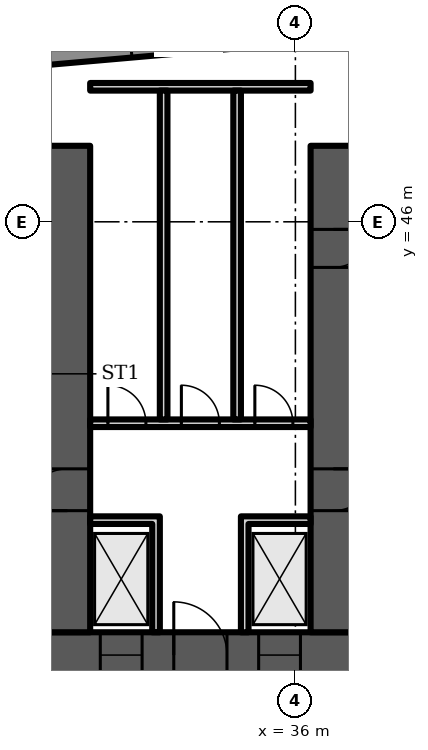
"""IFC4 building model, lengths in metres.
Left out: names, types, materials, properties, quantities, classifications, styles, units other than length and angle.
Written with IfcOpenShell. Run it as: python <this file> out.ifc"""

import sys

from ifc_helpers import new_model, si_unit, direction, frame, frame_2d, origin, place, context, subcontext, project, spatial, polyline, rectangle, outline, extrude, element, fill, save


model = new_model("IFC4")
c1 = context("Model", 3, precision=1e-05, world=origin(), true_north=direction((0.0, 1.0)))
c2 = subcontext(c1, "Body", "Model", "MODEL_VIEW")
j1 = project(units=[si_unit("LENGTHUNIT", "METRE"), si_unit("PLANEANGLEUNIT", "RADIAN")], contexts=[c1])
p1 = place(None, origin())
s1 = spatial("IfcSite", under=j1, at=p1, CompositionType="ELEMENT")
p2 = place(p1, origin())
s2 = spatial("IfcBuilding", under=s1, at=p2, CompositionType="ELEMENT")
p3 = place(p2, frame((0.0, 0.0, 21.5)))
s3 = spatial("IfcBuildingStorey", under=s2, at=p3, CompositionType="ELEMENT", Elevation=21.5)
p4 = place(p3, frame((47.301, 50.11, 0.0), z_axis=(0.0, 0.0, 1.0), x_axis=(-0.996195, 0.087143, 0.0)))
e1 = element("IfcWall", 1, at=p4, inside=s3, PredefinedType="SOLIDWALL", context=c2, shape_type="SweptSolid", body=[
    extrude(rectangle(XDim=10.26, YDim=0.45, at=frame_2d((5.13, 0.0))), origin(), (0.0, 0.0, 1.0), 5.7),
])
p5 = place(p4, frame((1.065, 0.0, 1.0)))
e2 = element("IfcOpeningElement", 2, at=p5, cuts=e1, PredefinedType="OPENING", context=c2, shape_type="SweptSolid", body=[
    extrude(rectangle(XDim=3.0, YDim=3.7, at=frame_2d((1.5, 1.85))), frame((0.0, 0.235, 0.0), z_axis=(0.0, -1.0, 0.0), x_axis=(1.0, 0.0, 0.0)), (0.0, 0.0, 1.0), 0.47),
])
p6 = place(p4, frame((6.195, 0.0, 1.0)))
e3 = element("IfcOpeningElement", 3, at=p6, cuts=e1, PredefinedType="OPENING", context=c2, shape_type="SweptSolid", body=[
    extrude(rectangle(XDim=3.0, YDim=3.7, at=frame_2d((1.5, 1.85))), frame((0.0, 0.235, 0.0), z_axis=(0.0, -1.0, 0.0), x_axis=(1.0, 0.0, 0.0)), (0.0, 0.0, 1.0), 0.47),
])
p7 = place(p3, frame((36.0, 50.924, 0.0), z_axis=(0.0, 0.0, 1.0), x_axis=(-0.996195, -0.087145, 0.0)))
e4 = element("IfcWall", 4, at=p7, inside=s3, PredefinedType="SOLIDWALL", context=c2, shape_type="SweptSolid", body=[
    extrude(rectangle(XDim=11.344, YDim=0.45, at=frame_2d((5.672, 0.0))), origin(), (0.0, 0.0, 1.0), 5.7),
])
p8 = place(p7, frame((1.336, 0.0, 1.0)))
e5 = element("IfcOpeningElement", 5, at=p8, cuts=e4, PredefinedType="OPENING", context=c2, shape_type="SweptSolid", body=[
    extrude(rectangle(XDim=3.0, YDim=3.7, at=frame_2d((1.5, 1.85))), frame((0.0, 0.235, 0.0), z_axis=(0.0, -1.0, 0.0), x_axis=(1.0, 0.0, 0.0)), (0.0, 0.0, 1.0), 0.47),
])
p9 = place(p7, frame((7.008, 0.0, 1.0)))
e6 = element("IfcOpeningElement", 6, at=p9, cuts=e4, PredefinedType="OPENING", context=c2, shape_type="SweptSolid", body=[
    extrude(rectangle(XDim=3.0, YDim=3.7, at=frame_2d((1.5, 1.85))), frame((0.0, 0.235, 0.0), z_axis=(0.0, -1.0, 0.0), x_axis=(1.0, 0.0, 0.0)), (0.0, 0.0, 1.0), 0.47),
])
p10 = place(p3, frame((9.0, 34.6, 0.0), z_axis=(0.0, 0.0, 1.0), x_axis=(1.0, 0.0, 0.0)))
e7 = element("IfcWall", 7, at=p10, inside=s3, PredefinedType="SHEAR", context=c2, shape_type="SweptSolid", body=[
    extrude(rectangle(XDim=56.0, YDim=1.2, at=frame_2d((28.0, 0.0))), origin(), (0.0, 0.0, 1.0), 5.7),
])
p11 = place(p10, frame((2.0, 0.0, 0.0)))
e8 = element("IfcOpeningElement", 8, at=p11, cuts=e7, PredefinedType="OPENING", context=c2, shape_type="SweptSolid", body=[
    extrude(rectangle(XDim=1.0, YDim=2.1, at=frame_2d((0.5, 1.05))), frame((0.0, 0.61, 0.0), z_axis=(0.0, -1.0, 0.0), x_axis=(1.0, 0.0, 0.0)), (0.0, 0.0, 1.0), 1.22),
])
p12 = place(p10, frame((4.6, 0.0, 0.0)))
e9 = element("IfcOpeningElement", 9, at=p12, cuts=e7, PredefinedType="OPENING", context=c2, shape_type="SweptSolid", body=[
    extrude(rectangle(XDim=1.0, YDim=2.1, at=frame_2d((0.5, 1.05))), frame((0.0, 0.61, 0.0), z_axis=(0.0, -1.0, 0.0), x_axis=(1.0, 0.0, 0.0)), (0.0, 0.0, 1.0), 1.22),
])
p13 = place(p10, frame((7.867, 0.0, 0.0)))
e10 = element("IfcOpeningElement", 10, at=p13, cuts=e7, PredefinedType="OPENING", context=c2, shape_type="SweptSolid", body=[
    extrude(rectangle(XDim=1.1, YDim=2.1, at=frame_2d((0.55, 1.05))), frame((0.0, 0.61, 0.0), z_axis=(0.0, -1.0, 0.0), x_axis=(1.0, 0.0, 0.0)), (0.0, 0.0, 1.0), 1.22),
])
p14 = place(p10, frame((12.033, 0.0, 0.0)))
e11 = element("IfcOpeningElement", 11, at=p14, cuts=e7, PredefinedType="OPENING", context=c2, shape_type="SweptSolid", body=[
    extrude(rectangle(XDim=1.1, YDim=2.1, at=frame_2d((0.55, 1.05))), frame((0.0, 0.61, 0.0), z_axis=(0.0, -1.0, 0.0), x_axis=(1.0, 0.0, 0.0)), (0.0, 0.0, 1.0), 1.22),
])
p15 = place(p10, frame((9.8, 0.0, 0.0)))
e12 = element("IfcOpeningElement", 12, at=p15, cuts=e7, PredefinedType="OPENING", context=c2, shape_type="SweptSolid", body=[
    extrude(rectangle(XDim=1.4, YDim=2.1, at=frame_2d((0.7, 1.05))), frame((0.0, 0.61, 0.0), z_axis=(0.0, -1.0, 0.0), x_axis=(1.0, 0.0, 0.0)), (0.0, 0.0, 1.0), 1.22),
])
p16 = place(p10, frame((14.65, 0.0, 0.0)))
e13 = element("IfcOpeningElement", 13, at=p16, cuts=e7, PredefinedType="OPENING", context=c2, shape_type="SweptSolid", body=[
    extrude(rectangle(XDim=1.2, YDim=2.1, at=frame_2d((0.6, 1.05))), frame((0.0, 0.61, 0.0), z_axis=(0.0, -1.0, 0.0), x_axis=(1.0, 0.0, 0.0)), (0.0, 0.0, 1.0), 1.22),
])
p17 = place(p10, frame((21.867, 0.0, 0.0)))
e14 = element("IfcOpeningElement", 14, at=p17, cuts=e7, PredefinedType="OPENING", context=c2, shape_type="SweptSolid", body=[
    extrude(rectangle(XDim=1.1, YDim=2.1, at=frame_2d((0.55, 1.05))), frame((0.0, 0.61, 0.0), z_axis=(0.0, -1.0, 0.0), x_axis=(1.0, 0.0, 0.0)), (0.0, 0.0, 1.0), 1.22),
])
p18 = place(p10, frame((26.033, 0.0, 0.0)))
e15 = element("IfcOpeningElement", 15, at=p18, cuts=e7, PredefinedType="OPENING", context=c2, shape_type="SweptSolid", body=[
    extrude(rectangle(XDim=1.1, YDim=2.1, at=frame_2d((0.55, 1.05))), frame((0.0, 0.61, 0.0), z_axis=(0.0, -1.0, 0.0), x_axis=(1.0, 0.0, 0.0)), (0.0, 0.0, 1.0), 1.22),
])
p19 = place(p10, frame((23.8, 0.0, 0.0)))
e16 = element("IfcOpeningElement", 16, at=p19, cuts=e7, PredefinedType="OPENING", context=c2, shape_type="SweptSolid", body=[
    extrude(rectangle(XDim=1.4, YDim=2.1, at=frame_2d((0.7, 1.05))), frame((0.0, 0.61, 0.0), z_axis=(0.0, -1.0, 0.0), x_axis=(1.0, 0.0, 0.0)), (0.0, 0.0, 1.0), 1.22),
])
p20 = place(p10, frame((28.867, 0.0, 0.0)))
e17 = element("IfcOpeningElement", 17, at=p20, cuts=e7, PredefinedType="OPENING", context=c2, shape_type="SweptSolid", body=[
    extrude(rectangle(XDim=1.1, YDim=2.1, at=frame_2d((0.55, 1.05))), frame((0.0, 0.61, 0.0), z_axis=(0.0, -1.0, 0.0), x_axis=(1.0, 0.0, 0.0)), (0.0, 0.0, 1.0), 1.22),
])
p21 = place(p10, frame((33.033, 0.0, 0.0)))
e18 = element("IfcOpeningElement", 18, at=p21, cuts=e7, PredefinedType="OPENING", context=c2, shape_type="SweptSolid", body=[
    extrude(rectangle(XDim=1.1, YDim=2.1, at=frame_2d((0.55, 1.05))), frame((0.0, 0.61, 0.0), z_axis=(0.0, -1.0, 0.0), x_axis=(1.0, 0.0, 0.0)), (0.0, 0.0, 1.0), 1.22),
])
p22 = place(p10, frame((40.15, 0.0, 0.0)))
e19 = element("IfcOpeningElement", 19, at=p22, cuts=e7, PredefinedType="OPENING", context=c2, shape_type="SweptSolid", body=[
    extrude(rectangle(XDim=1.2, YDim=2.1, at=frame_2d((0.6, 1.05))), frame((0.0, 0.61, 0.0), z_axis=(0.0, -1.0, 0.0), x_axis=(1.0, 0.0, 0.0)), (0.0, 0.0, 1.0), 1.22),
])
p23 = place(p10, frame((44.8, 0.0, 0.0)))
e20 = element("IfcOpeningElement", 20, at=p23, cuts=e7, PredefinedType="OPENING", context=c2, shape_type="SweptSolid", body=[
    extrude(rectangle(XDim=1.4, YDim=2.1, at=frame_2d((0.7, 1.05))), frame((0.0, 0.61, 0.0), z_axis=(0.0, -1.0, 0.0), x_axis=(1.0, 0.0, 0.0)), (0.0, 0.0, 1.0), 1.22),
])
p24 = place(p10, frame((49.867, 0.0, 0.0)))
e21 = element("IfcOpeningElement", 21, at=p24, cuts=e7, PredefinedType="OPENING", context=c2, shape_type="SweptSolid", body=[
    extrude(rectangle(XDim=1.1, YDim=2.1, at=frame_2d((0.55, 1.05))), frame((0.0, 0.61, 0.0), z_axis=(0.0, -1.0, 0.0), x_axis=(1.0, 0.0, 0.0)), (0.0, 0.0, 1.0), 1.22),
])
p25 = place(p10, frame((53.5, 0.0, 0.0)))
e22 = element("IfcOpeningElement", 22, at=p25, cuts=e7, PredefinedType="OPENING", context=c2, shape_type="SweptSolid", body=[
    extrude(rectangle(XDim=1.1, YDim=2.1, at=frame_2d((0.55, 1.05))), frame((0.0, 0.61, 0.0), z_axis=(0.0, -1.0, 0.0), x_axis=(1.0, 0.0, 0.0)), (0.0, 0.0, 1.0), 1.22),
])
p26 = place(p10, frame((51.567, 0.0, 0.0)))
e23 = element("IfcOpeningElement", 23, at=p26, cuts=e7, PredefinedType="OPENING", context=c2, shape_type="SweptSolid", body=[
    extrude(rectangle(XDim=1.4, YDim=2.1, at=frame_2d((0.7, 1.05))), frame((0.0, 0.61, 0.0), z_axis=(0.0, -1.0, 0.0), x_axis=(1.0, 0.0, 0.0)), (0.0, 0.0, 1.0), 1.22),
])
p27 = place(p3, frame((30.0, 35.2, 0.0), z_axis=(0.0, 0.0, 1.0), x_axis=(0.0, 1.0, 0.0)))
e24 = element("IfcWall", 24, at=p27, inside=s3, PredefinedType="SHEAR", context=c2, shape_type="SweptSolid", body=[
    extrude(rectangle(XDim=12.8, YDim=1.2, at=frame_2d((6.4, 0.0))), origin(), (0.0, 0.0, 1.0), 5.7),
])
p28 = place(p27, frame((3.2, 0.0, 0.0)))
e25 = element("IfcOpeningElement", 25, at=p28, cuts=e24, PredefinedType="OPENING", context=c2, shape_type="SweptSolid", body=[
    extrude(rectangle(XDim=1.1, YDim=2.1, at=frame_2d((0.55, 1.05))), frame((0.0, 0.61, 0.0), z_axis=(0.0, -1.0, 0.0), x_axis=(1.0, 0.0, 0.0)), (0.0, 0.0, 1.0), 1.22),
])
p29 = place(p3, frame((37.0, 35.2, 0.0), z_axis=(0.0, 0.0, 1.0), x_axis=(0.0, 1.0, 0.0)))
e26 = element("IfcWall", 26, at=p29, inside=s3, PredefinedType="SHEAR", context=c2, shape_type="SweptSolid", body=[
    extrude(rectangle(XDim=12.8, YDim=1.2, at=frame_2d((6.4, 0.0))), origin(), (0.0, 0.0, 1.0), 5.7),
])
p30 = place(p29, frame((3.2, 0.0, 0.0)))
e27 = element("IfcOpeningElement", 27, at=p30, cuts=e26, PredefinedType="OPENING", context=c2, shape_type="SweptSolid", body=[
    extrude(rectangle(XDim=1.1, YDim=2.1, at=frame_2d((0.55, 1.05))), frame((0.0, 0.61, 0.0), z_axis=(0.0, -1.0, 0.0), x_axis=(1.0, 0.0, 0.0)), (0.0, 0.0, 1.0), 1.22),
])
p31 = place(p29, frame((9.6, 0.0, 0.0)))
e28 = element("IfcOpeningElement", 28, at=p31, cuts=e26, PredefinedType="OPENING", context=c2, shape_type="SweptSolid", body=[
    extrude(rectangle(XDim=1.0, YDim=2.1, at=frame_2d((0.5, 1.05))), frame((0.0, 0.61, 0.0), z_axis=(0.0, -1.0, 0.0), x_axis=(1.0, 0.0, 0.0)), (0.0, 0.0, 1.0), 1.22),
])
p32 = place(p3, frame((30.6, 40.7, 0.0), z_axis=(0.0, 0.0, 1.0), x_axis=(1.0, 0.0, 0.0)))
e29 = element("IfcWall", 29, at=p32, inside=s3, PredefinedType="PARTITIONING", context=c2, shape_type="SweptSolid", body=[
    extrude(rectangle(XDim=5.8, YDim=0.2, at=frame_2d((2.9, 0.0))), origin(), (0.0, 0.0, 1.0), 5.7),
])
p33 = place(p32, frame((0.467, 0.0, 0.0)))
e30 = element("IfcOpeningElement", 30, at=p33, cuts=e29, PredefinedType="OPENING", context=c2, shape_type="SweptSolid", body=[
    extrude(rectangle(XDim=1.0, YDim=2.1, at=frame_2d((0.5, 1.05))), frame((0.0, 0.11, 0.0), z_axis=(0.0, -1.0, 0.0), x_axis=(1.0, 0.0, 0.0)), (0.0, 0.0, 1.0), 0.22),
])
p34 = place(p32, frame((2.4, 0.0, 0.0)))
e31 = element("IfcOpeningElement", 31, at=p34, cuts=e29, PredefinedType="OPENING", context=c2, shape_type="SweptSolid", body=[
    extrude(rectangle(XDim=1.0, YDim=2.1, at=frame_2d((0.5, 1.05))), frame((0.0, 0.11, 0.0), z_axis=(0.0, -1.0, 0.0), x_axis=(1.0, 0.0, 0.0)), (0.0, 0.0, 1.0), 0.22),
])
p35 = place(p32, frame((4.333, 0.0, 0.0)))
e32 = element("IfcOpeningElement", 32, at=p35, cuts=e29, PredefinedType="OPENING", context=c2, shape_type="SweptSolid", body=[
    extrude(rectangle(XDim=1.0, YDim=2.1, at=frame_2d((0.5, 1.05))), frame((0.0, 0.11, 0.0), z_axis=(0.0, -1.0, 0.0), x_axis=(1.0, 0.0, 0.0)), (0.0, 0.0, 1.0), 0.22),
])
p36 = place(p3, frame((0.0, 0.0, -0.0)))
e33 = element("IfcWall", 33, at=p36, inside=s3, PredefinedType="PARTITIONING", context=c2, shape_type="SweptSolid", body=[
    extrude(outline(polyline([(32.233, 38.05), (30.6, 38.05), (30.6, 38.25), (32.233, 38.25), (32.433, 38.25), (32.433, 35.2), (32.233, 35.2), (32.233, 38.05)])), origin(), (0.0, 0.0, 1.0), 5.7),
])
p37 = place(p3, frame((0.0, 0.0, -0.0)))
e34 = element("IfcWall", 34, at=p37, inside=s3, PredefinedType="PARTITIONING", context=c2, shape_type="SweptSolid", body=[
    extrude(outline(polyline([(34.567, 38.25), (34.767, 38.25), (36.4, 38.25), (36.4, 38.05), (34.767, 38.05), (34.767, 35.2), (34.567, 35.2), (34.567, 38.25)])), origin(), (0.0, 0.0, 1.0), 5.7),
])
p38 = place(p3, frame((30.6, 49.552, 0.0), z_axis=(0.0, 0.0, 1.0), x_axis=(1.0, 0.0, 0.0)))
e35 = element("IfcWall", 35, at=p38, inside=s3, PredefinedType="PARTITIONING", context=c2, shape_type="SweptSolid", body=[
    extrude(rectangle(XDim=5.8, YDim=0.2, at=frame_2d((2.9, 0.0))), origin(), (0.0, 0.0, 1.0), 5.7),
])
for number, where, z_axis, x_axis in (
    (36, (32.533, 40.8, 0.0), (0.0, 0.0, 1.0), (0.0, 1.0, 0.0)),
    (37, (34.467, 40.8, 0.0), (0.0, 0.0, 1.0), (0.0, 1.0, 0.0)),
):
    element("IfcWall", number, at=place(p3, frame(where, z_axis=z_axis, x_axis=x_axis)), inside=s3, PredefinedType="PARTITIONING", context=c2, shape_type="SweptSolid", body=[
        extrude(rectangle(XDim=8.653, YDim=0.2, at=frame_2d((4.326, 0.0))), origin(), (0.0, 0.0, 1.0), 5.7),
    ])
p39 = place(p8, origin())
e38 = element("IfcWindow", 38, at=p39, inside=s3, PartitioningType="SINGLE_PANEL", PredefinedType="WINDOW", context=c2, shape_type="SweptSolid", body=[
    extrude(rectangle(XDim=3.0, YDim=3.7, at=frame_2d((1.5, 1.85))), frame((0.0, 0.105, 0.0), z_axis=(0.0, -1.0, 0.0), x_axis=(1.0, 0.0, 0.0)), (0.0, 0.0, 1.0), 0.06),
])
fill(e5, e38)
p40 = place(p17, origin())
e39 = element("IfcDoor", 39, at=p40, inside=s3, OperationType="DOUBLE_DOOR_SLIDING", PredefinedType="DOOR", context=c2, shape_type="SweptSolid", body=[
    extrude(rectangle(XDim=1.1, YDim=2.1, at=frame_2d((0.55, 1.05))), frame((0.0, 0.025, 0.0), z_axis=(0.0, -1.0, 0.0), x_axis=(1.0, 0.0, 0.0)), (0.0, 0.0, 1.0), 0.05),
])
fill(e14, e39)
p41 = place(p18, origin())
e40 = element("IfcDoor", 40, at=p41, inside=s3, OperationType="DOUBLE_DOOR_SLIDING", PredefinedType="DOOR", context=c2, shape_type="SweptSolid", body=[
    extrude(rectangle(XDim=1.1, YDim=2.1, at=frame_2d((0.55, 1.05))), frame((0.0, 0.025, 0.0), z_axis=(0.0, -1.0, 0.0), x_axis=(1.0, 0.0, 0.0)), (0.0, 0.0, 1.0), 0.05),
])
fill(e15, e40)
p42 = place(p19, origin())
e41 = element("IfcDoor", 41, at=p42, inside=s3, OperationType="DOUBLE_DOOR_SINGLE_SWING", PredefinedType="DOOR", context=c2, shape_type="SweptSolid", body=[
    extrude(rectangle(XDim=1.4, YDim=2.1, at=frame_2d((0.7, 1.05))), frame((0.0, 0.025, 0.0), z_axis=(0.0, -1.0, 0.0), x_axis=(1.0, 0.0, 0.0)), (0.0, 0.0, 1.0), 0.05),
])
fill(e16, e41)
p43 = place(p33, origin())
e42 = element("IfcDoor", 42, at=p43, inside=s3, OperationType="SINGLE_SWING_LEFT", PredefinedType="DOOR", context=c2, shape_type="SweptSolid", body=[
    extrude(rectangle(XDim=1.0, YDim=2.1, at=frame_2d((0.5, 1.05))), frame((0.0, 0.025, 0.0), z_axis=(0.0, -1.0, 0.0), x_axis=(1.0, 0.0, 0.0)), (0.0, 0.0, 1.0), 0.05),
])
fill(e30, e42)
p44 = place(p34, origin())
e43 = element("IfcDoor", 43, at=p44, inside=s3, OperationType="SINGLE_SWING_LEFT", PredefinedType="DOOR", context=c2, shape_type="SweptSolid", body=[
    extrude(rectangle(XDim=1.0, YDim=2.1, at=frame_2d((0.5, 1.05))), frame((0.0, 0.025, 0.0), z_axis=(0.0, -1.0, 0.0), x_axis=(1.0, 0.0, 0.0)), (0.0, 0.0, 1.0), 0.05),
])
fill(e31, e43)
p45 = place(p35, origin())
e44 = element("IfcDoor", 44, at=p45, inside=s3, OperationType="SINGLE_SWING_LEFT", PredefinedType="DOOR", context=c2, shape_type="SweptSolid", body=[
    extrude(rectangle(XDim=1.0, YDim=2.1, at=frame_2d((0.5, 1.05))), frame((0.0, 0.025, 0.0), z_axis=(0.0, -1.0, 0.0), x_axis=(1.0, 0.0, 0.0)), (0.0, 0.0, 1.0), 0.05),
])
fill(e32, e44)
p46 = place(p28, origin())
e45 = element("IfcDoor", 45, at=p46, inside=s3, OperationType="SINGLE_SWING_LEFT", PredefinedType="DOOR", context=c2, shape_type="SweptSolid", body=[
    extrude(rectangle(XDim=1.1, YDim=2.1, at=frame_2d((0.55, 1.05))), frame((0.0, 0.025, 0.0), z_axis=(0.0, -1.0, 0.0), x_axis=(1.0, 0.0, 0.0)), (0.0, 0.0, 1.0), 0.05),
])
fill(e25, e45)
p47 = place(p30, origin())
e46 = element("IfcDoor", 46, at=p47, inside=s3, OperationType="SINGLE_SWING_RIGHT", PredefinedType="DOOR", context=c2, shape_type="SweptSolid", body=[
    extrude(rectangle(XDim=1.1, YDim=2.1, at=frame_2d((0.55, 1.05))), frame((0.0, 0.025, 0.0), z_axis=(0.0, -1.0, 0.0), x_axis=(1.0, 0.0, 0.0)), (0.0, 0.0, 1.0), 0.05),
])
fill(e27, e46)
p48 = place(p31, origin())
e47 = element("IfcDoor", 47, at=p48, inside=s3, OperationType="SINGLE_SWING_RIGHT", PredefinedType="DOOR", context=c2, shape_type="SweptSolid", body=[
    extrude(rectangle(XDim=1.0, YDim=2.1, at=frame_2d((0.5, 1.05))), frame((0.0, 0.6, 0.0), z_axis=(0.0, -1.0, 0.0), x_axis=(1.0, 0.0, 0.0)), (0.0, 0.0, 1.0), 1.199),
])
fill(e28, e47)
save(model, sys.argv[1])
